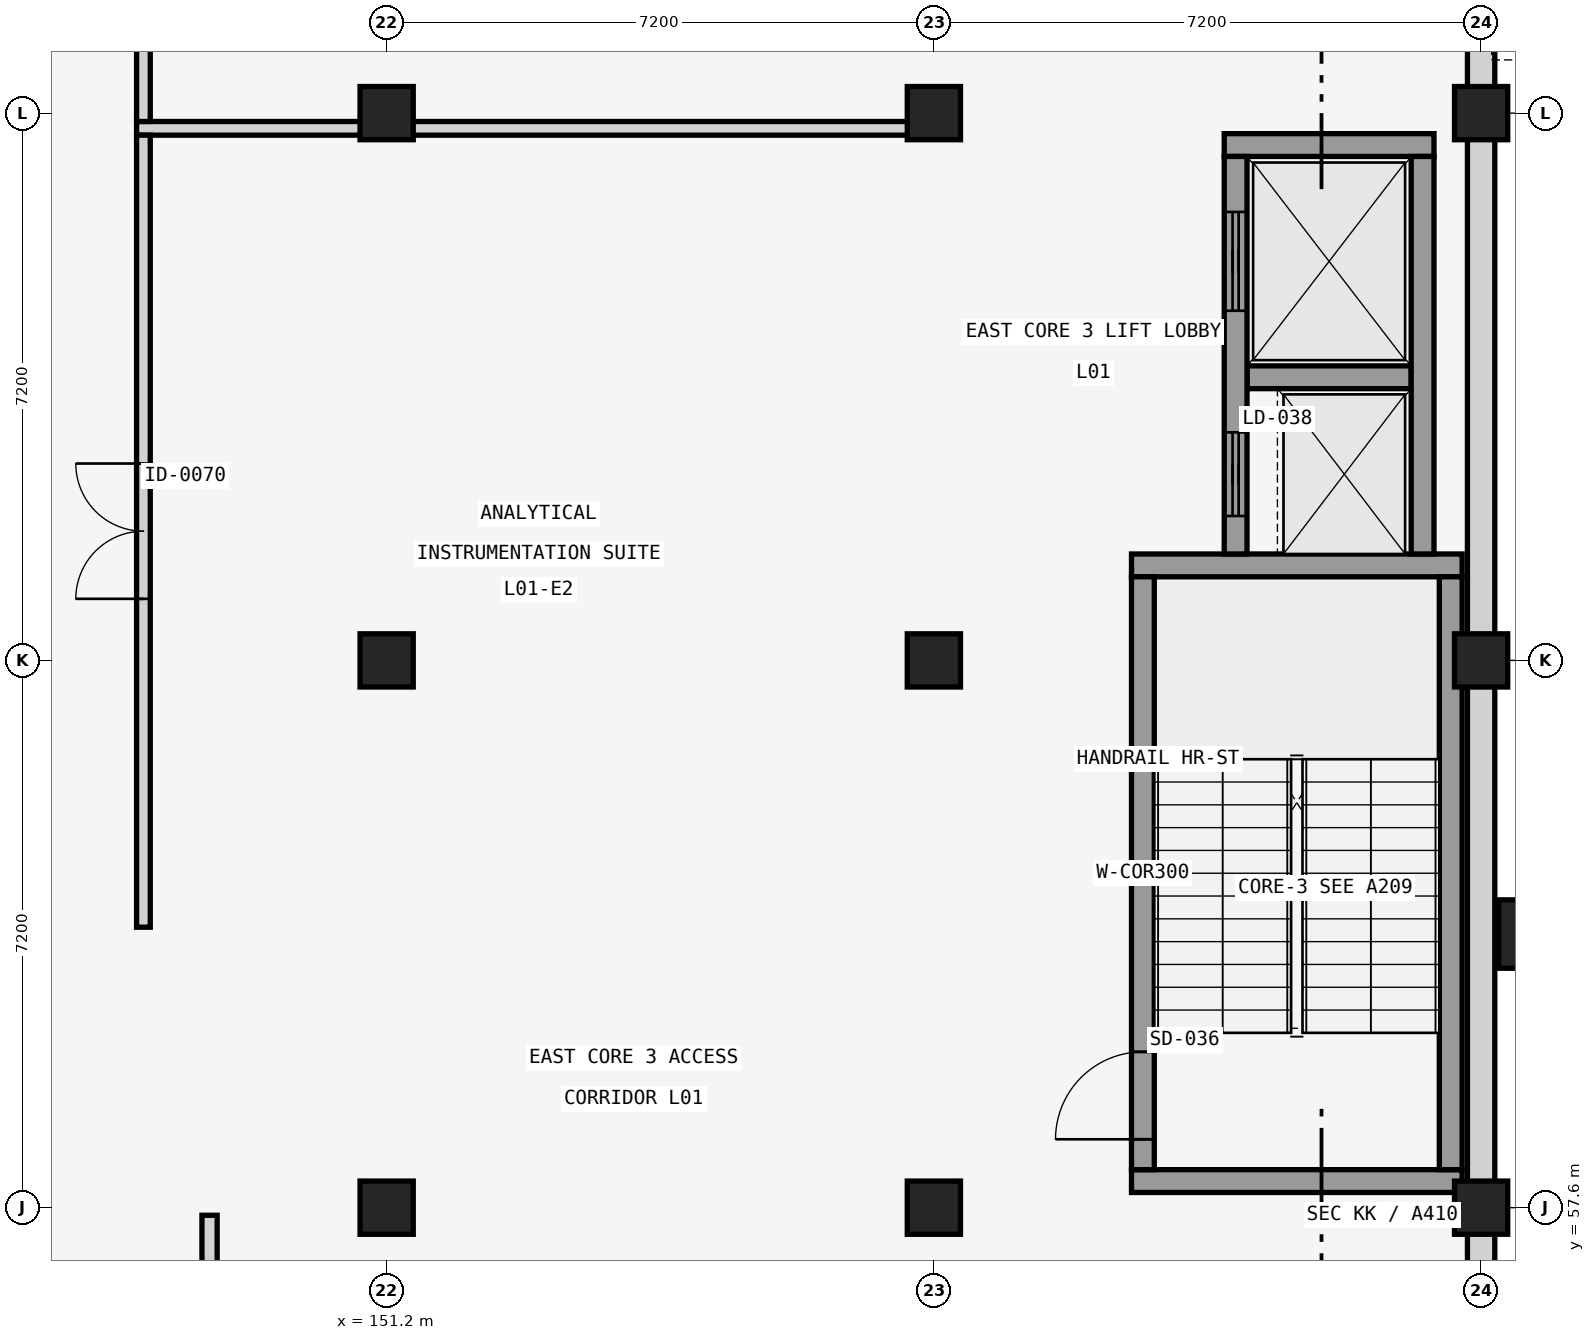
"""IFC4 building model, lengths in metres.
Left out: names, types, materials, properties, quantities, classifications, styles, units other than length and angle.
Written with IfcOpenShell. Run it as: python <this file> out.ifc"""

import sys

from ifc_helpers import new_model, si_unit, direction, frame, frame_2d, origin, origin_2d, place, context, subcontext, project, spatial, rectangle, extrude, element, fill, save


model = new_model("IFC4")
c1 = context("Model", 3, precision=1e-05, world=origin(), true_north=direction((0.0, 1.0)))
c2 = subcontext(c1, "Body", "Model", "MODEL_VIEW")
j1 = project(units=[si_unit("LENGTHUNIT", "METRE"), si_unit("PLANEANGLEUNIT", "RADIAN")], contexts=[c1])
p1 = place(None, origin())
s1 = spatial("IfcSite", under=j1, at=p1, CompositionType="ELEMENT")
p2 = place(p1, origin())
s2 = spatial("IfcBuilding", under=s1, at=p2, CompositionType="ELEMENT")
p3 = place(p2, frame((0.0, 0.0, 4.8)))
s3 = spatial("IfcBuildingStorey", under=s2, at=p3, CompositionType="ELEMENT", Elevation=4.8)
for number, where, z_axis, x_axis in (
    (1, (151.2, 57.6, 0.0), (0.0, 0.0, 1.0), (1.0, 0.0, 0.0)),
    (2, (151.2, 64.8, 0.0), (0.0, 0.0, 1.0), (1.0, 0.0, 0.0)),
    (3, (151.2, 72.0, 0.0), (0.0, 0.0, 1.0), (1.0, 0.0, 0.0)),
    (4, (158.4, 57.6, 0.0), (0.0, 0.0, 1.0), (1.0, 0.0, 0.0)),
    (5, (158.4, 64.8, 0.0), (0.0, 0.0, 1.0), (1.0, 0.0, 0.0)),
    (6, (158.4, 72.0, 0.0), (0.0, 0.0, 1.0), (1.0, 0.0, 0.0)),
    (7, (165.6, 57.6, 0.0), (0.0, 0.0, 1.0), (1.0, 0.0, 0.0)),
    (8, (165.6, 64.8, 0.0), (0.0, 0.0, 1.0), (1.0, 0.0, 0.0)),
    (9, (165.6, 72.0, 0.0), (0.0, 0.0, 1.0), (1.0, 0.0, 0.0)),
):
    element("IfcColumn", number, at=place(p3, frame(where, z_axis=z_axis, x_axis=x_axis)), inside=s3, PredefinedType="COLUMN", context=c2, shape_type="SweptSolid", body=[
        extrude(rectangle(XDim=0.7, YDim=0.7, at=origin_2d()), origin(), (0.0, 0.0, 1.0), 4.16),
    ])
p4 = place(p3, frame((166.08, 61.2, 0.0), z_axis=(0.0, 0.0, 1.0), x_axis=(1.0, 0.0, 0.0)))
e10 = element("IfcColumn", 10, at=p4, inside=s3, PredefinedType="PILASTER", context=c2, shape_type="SweptSolid", body=[
    extrude(rectangle(XDim=0.5, YDim=0.9, at=origin_2d()), origin(), (0.0, 0.0, 1.0), 4.16),
])
p5 = place(p3, frame((165.6, 50.74, 0.0), z_axis=(0.0, 0.0, 1.0), x_axis=(0.0, 1.0, 0.0)))
e11 = element("IfcWall", 11, at=p5, inside=s3, PredefinedType="SOLIDWALL", context=c2, shape_type="SweptSolid", body=[
    extrude(rectangle(XDim=6.52, YDim=0.36, at=frame_2d((3.26, 0.0))), origin(), (0.0, 0.0, 1.0), 3.11),
])
p6 = place(p5, frame((1.91, 0.0, 0.95)))
e12 = element("IfcOpeningElement", 12, at=p6, cuts=e11, PredefinedType="OPENING", context=c2, shape_type="SweptSolid", body=[
    extrude(rectangle(XDim=2.7, YDim=1.8, at=frame_2d((1.35, 0.9))), frame((0.0, 0.19, 0.0), z_axis=(0.0, -1.0, 0.0), x_axis=(1.0, 0.0, 0.0)), (0.0, 0.0, 1.0), 0.38),
])
for number, where, z_axis, x_axis in (
    (13, (165.6, 57.94, 0.0), (0.0, 0.0, 1.0), (0.0, 1.0, 0.0)),
    (14, (165.6, 65.14, 0.0), (0.0, 0.0, 1.0), (0.0, 1.0, 0.0)),
):
    element("IfcWall", number, at=place(p3, frame(where, z_axis=z_axis, x_axis=x_axis)), inside=s3, PredefinedType="SOLIDWALL", context=c2, shape_type="SweptSolid", body=[
        extrude(rectangle(XDim=6.52, YDim=0.36, at=frame_2d((3.26, 0.0))), origin(), (0.0, 0.0, 1.0), 3.11),
    ])
p7 = place(p3, frame((165.6, 72.34, 0.0), z_axis=(0.0, 0.0, 1.0), x_axis=(0.0, 1.0, 0.0)))
e15 = element("IfcWall", 15, at=p7, inside=s3, PredefinedType="SOLIDWALL", context=c2, shape_type="SweptSolid", body=[
    extrude(rectangle(XDim=6.52, YDim=0.36, at=frame_2d((3.26, 0.0))), origin(), (0.0, 0.0, 1.0), 3.11),
])
p8 = place(p7, frame((1.46, 0.0, 0.95)))
e16 = element("IfcOpeningElement", 16, at=p8, cuts=e15, PredefinedType="OPENING", context=c2, shape_type="SweptSolid", body=[
    extrude(rectangle(XDim=3.6, YDim=1.8, at=frame_2d((1.8, 0.9))), frame((0.0, 0.19, 0.0), z_axis=(0.0, -1.0, 0.0), x_axis=(1.0, 0.0, 0.0)), (0.0, 0.0, 1.0), 0.38),
])
for number, where, z_axis, x_axis in (
    (17, (161.0, 57.95, 0.0), (0.0, 0.0, 1.0), (1.0, 0.0, 0.0)),
    (18, (161.0, 66.05, 0.0), (0.0, 0.0, 1.0), (1.0, 0.0, 0.0)),
):
    element("IfcWall", number, at=place(p3, frame(where, z_axis=z_axis, x_axis=x_axis)), inside=s3, PredefinedType="SHEAR", context=c2, shape_type="SweptSolid", body=[
        extrude(rectangle(XDim=4.35, YDim=0.3, at=frame_2d((2.175, 0.0))), origin(), (0.0, 0.0, 1.0), 3.81),
    ])
p9 = place(p3, frame((161.15, 58.1, 0.0), z_axis=(0.0, 0.0, 1.0), x_axis=(0.0, 1.0, 0.0)))
e19 = element("IfcWall", 19, at=p9, inside=s3, PredefinedType="SHEAR", context=c2, shape_type="SweptSolid", body=[
    extrude(rectangle(XDim=7.8, YDim=0.3, at=frame_2d((3.9, 0.0))), origin(), (0.0, 0.0, 1.0), 3.81),
])
p10 = place(p9, frame((0.4, 0.0, 0.0)))
e20 = element("IfcOpeningElement", 20, at=p10, cuts=e19, PredefinedType="OPENING", context=c2, shape_type="SweptSolid", body=[
    extrude(rectangle(XDim=1.15, YDim=2.2, at=frame_2d((0.575, 1.1))), frame((0.0, 0.16, 0.0), z_axis=(0.0, -1.0, 0.0), x_axis=(1.0, 0.0, 0.0)), (0.0, 0.0, 1.0), 0.32),
])
p11 = place(p3, frame((165.2, 58.1, 0.0), z_axis=(0.0, 0.0, 1.0), x_axis=(0.0, 1.0, 0.0)))
e21 = element("IfcWall", 21, at=p11, inside=s3, PredefinedType="SHEAR", context=c2, shape_type="SweptSolid", body=[
    extrude(rectangle(XDim=7.8, YDim=0.3, at=frame_2d((3.9, 0.0))), origin(), (0.0, 0.0, 1.0), 3.81),
])
p12 = place(p3, frame((162.22, 71.58, 0.0), z_axis=(0.0, 0.0, 1.0), x_axis=(1.0, 0.0, 0.0)))
e22 = element("IfcWall", 22, at=p12, inside=s3, PredefinedType="SHEAR", context=c2, shape_type="SweptSolid", body=[
    extrude(rectangle(XDim=2.76, YDim=0.3, at=frame_2d((1.38, 0.0))), origin(), (0.0, 0.0, 1.0), 3.81),
])
p13 = place(p3, frame((162.52, 68.525, 0.0), z_axis=(0.0, 0.0, 1.0), x_axis=(1.0, 0.0, 0.0)))
e23 = element("IfcWall", 23, at=p13, inside=s3, PredefinedType="SHEAR", context=c2, shape_type="SweptSolid", body=[
    extrude(rectangle(XDim=2.16, YDim=0.3, at=frame_2d((1.08, 0.0))), origin(), (0.0, 0.0, 1.0), 3.81),
])
p14 = place(p3, frame((162.37, 66.2, 0.0), z_axis=(0.0, 0.0, 1.0), x_axis=(0.0, 1.0, 0.0)))
e24 = element("IfcWall", 24, at=p14, inside=s3, PredefinedType="SHEAR", context=c2, shape_type="SweptSolid", body=[
    extrude(rectangle(XDim=5.23, YDim=0.3, at=frame_2d((2.615, 0.0))), origin(), (0.0, 0.0, 1.0), 3.81),
])
p15 = place(p14, frame((0.5, 0.0, 0.0)))
e25 = element("IfcOpeningElement", 25, at=p15, cuts=e24, PredefinedType="OPENING", context=c2, shape_type="SweptSolid", body=[
    extrude(rectangle(XDim=1.1, YDim=2.2, at=frame_2d((0.55, 1.1))), frame((0.0, 0.16, 0.0), z_axis=(0.0, -1.0, 0.0), x_axis=(1.0, 0.0, 0.0)), (0.0, 0.0, 1.0), 0.32),
])
p16 = place(p14, frame((3.2, 0.0, 0.0)))
e26 = element("IfcOpeningElement", 26, at=p16, cuts=e24, PredefinedType="OPENING", context=c2, shape_type="SweptSolid", body=[
    extrude(rectangle(XDim=1.3, YDim=2.2, at=frame_2d((0.65, 1.1))), frame((0.0, 0.16, 0.0), z_axis=(0.0, -1.0, 0.0), x_axis=(1.0, 0.0, 0.0)), (0.0, 0.0, 1.0), 0.32),
])
p17 = place(p3, frame((164.83, 66.2, 0.0), z_axis=(0.0, 0.0, 1.0), x_axis=(0.0, 1.0, 0.0)))
e27 = element("IfcWall", 27, at=p17, inside=s3, PredefinedType="SHEAR", context=c2, shape_type="SweptSolid", body=[
    extrude(rectangle(XDim=5.23, YDim=0.3, at=frame_2d((2.615, 0.0))), origin(), (0.0, 0.0, 1.0), 3.81),
])
p18 = place(p3, frame((148.87, 36.16, 0.0), z_axis=(0.0, 0.0, 1.0), x_axis=(0.0, 1.0, 0.0)))
e28 = element("IfcWall", 28, at=p18, inside=s3, PredefinedType="PARTITIONING", context=c2, shape_type="SweptSolid", body=[
    extrude(rectangle(XDim=21.34, YDim=0.2, at=frame_2d((10.67, 0.0))), origin(), (0.0, 0.0, 1.0), 3.11),
])
p19 = place(p18, frame((9.81, 0.0, 0.0)))
e29 = element("IfcOpeningElement", 29, at=p19, cuts=e28, PredefinedType="OPENING", context=c2, shape_type="SweptSolid", body=[
    extrude(rectangle(XDim=1.72, YDim=2.26, at=frame_2d((0.86, 1.13))), frame((0.0, 0.11, 0.0), z_axis=(0.0, -1.0, 0.0), x_axis=(1.0, 0.0, 0.0)), (0.0, 0.0, 1.0), 0.22),
])
p20 = place(p3, frame((147.91, 71.8, 0.0), z_axis=(0.0, 0.0, 1.0), x_axis=(1.0, 0.0, 0.0)))
e30 = element("IfcWall", 30, at=p20, inside=s3, PredefinedType="PARTITIONING", context=c2, shape_type="SweptSolid", body=[
    extrude(rectangle(XDim=10.58, YDim=0.18, at=frame_2d((5.29, 0.0))), origin(), (0.0, 0.0, 1.0), 3.11),
])
p21 = place(p3, frame((148.0, 61.29, 0.0), z_axis=(0.0, 0.0, 1.0), x_axis=(0.0, 1.0, 0.0)))
e31 = element("IfcWall", 31, at=p21, inside=s3, PredefinedType="PARTITIONING", context=c2, shape_type="SweptSolid", body=[
    extrude(rectangle(XDim=10.42, YDim=0.18, at=frame_2d((5.21, 0.0))), origin(), (0.0, 0.0, 1.0), 3.11),
])
p22 = place(p21, frame((4.32, 0.0, 0.0)))
e32 = element("IfcOpeningElement", 32, at=p22, cuts=e31, PredefinedType="OPENING", context=c2, shape_type="SweptSolid", body=[
    extrude(rectangle(XDim=1.78, YDim=2.26, at=frame_2d((0.89, 1.13))), frame((0.0, 0.1, 0.0), z_axis=(0.0, -1.0, 0.0), x_axis=(1.0, 0.0, 0.0)), (0.0, 0.0, 1.0), 0.2),
])
p23 = place(p3, frame((148.0, 71.89, 0.0), z_axis=(0.0, 0.0, 1.0), x_axis=(0.0, 1.0, 0.0)))
e33 = element("IfcWall", 33, at=p23, inside=s3, PredefinedType="PARTITIONING", context=c2, shape_type="SweptSolid", body=[
    extrude(rectangle(XDim=21.62, YDim=0.18, at=frame_2d((10.81, 0.0))), origin(), (0.0, 0.0, 1.0), 3.11),
])
p24 = place(p23, frame((9.89, 0.0, 0.0)))
e34 = element("IfcOpeningElement", 34, at=p24, cuts=e33, PredefinedType="OPENING", context=c2, shape_type="SweptSolid", body=[
    extrude(rectangle(XDim=1.84, YDim=2.26, at=frame_2d((0.92, 1.13))), frame((0.0, 0.1, 0.0), z_axis=(0.0, -1.0, 0.0), x_axis=(1.0, 0.0, 0.0)), (0.0, 0.0, 1.0), 0.2),
])
p25 = place(p10, frame((1.15, 0.0, 0.0), z_axis=(0.0, 0.0, 1.0), x_axis=(-1.0, 0.0, 0.0)))
e35 = element("IfcDoor", 35, at=p25, inside=s3, OperationType="SINGLE_SWING_LEFT", PredefinedType="DOOR", context=c2, shape_type="SweptSolid", body=[
    extrude(rectangle(XDim=1.15, YDim=2.2, at=frame_2d((0.575, 1.1))), frame((0.0, 0.025, 0.0), z_axis=(0.0, -1.0, 0.0), x_axis=(1.0, 0.0, 0.0)), (0.0, 0.0, 1.0), 0.05),
])
fill(e20, e35)
p26 = place(p15, origin())
e36 = element("IfcDoor", 36, at=p26, inside=s3, OperationType="SLIDING_TO_LEFT", PredefinedType="DOOR", context=c2, shape_type="SweptSolid", body=[
    extrude(rectangle(XDim=1.1, YDim=2.2, at=frame_2d((0.55, 1.1))), frame((0.0, 0.025, 0.0), z_axis=(0.0, -1.0, 0.0), x_axis=(1.0, 0.0, 0.0)), (0.0, 0.0, 1.0), 0.05),
])
fill(e25, e36)
p27 = place(p16, origin())
e37 = element("IfcDoor", 37, at=p27, inside=s3, OperationType="SLIDING_TO_LEFT", PredefinedType="DOOR", context=c2, shape_type="SweptSolid", body=[
    extrude(rectangle(XDim=1.3, YDim=2.2, at=frame_2d((0.65, 1.1))), frame((0.0, 0.025, 0.0), z_axis=(0.0, -1.0, 0.0), x_axis=(1.0, 0.0, 0.0)), (0.0, 0.0, 1.0), 0.05),
])
fill(e26, e37)
p28 = place(p22, origin())
e38 = element("IfcDoor", 38, at=p28, inside=s3, OperationType="DOUBLE_DOOR_SINGLE_SWING", PredefinedType="DOOR", context=c2, shape_type="SweptSolid", body=[
    extrude(rectangle(XDim=1.78, YDim=2.26, at=frame_2d((0.89, 1.13))), frame((0.0, 0.025, 0.0), z_axis=(0.0, -1.0, 0.0), x_axis=(1.0, 0.0, 0.0)), (0.0, 0.0, 1.0), 0.05),
])
fill(e32, e38)
save(model, sys.argv[1])
